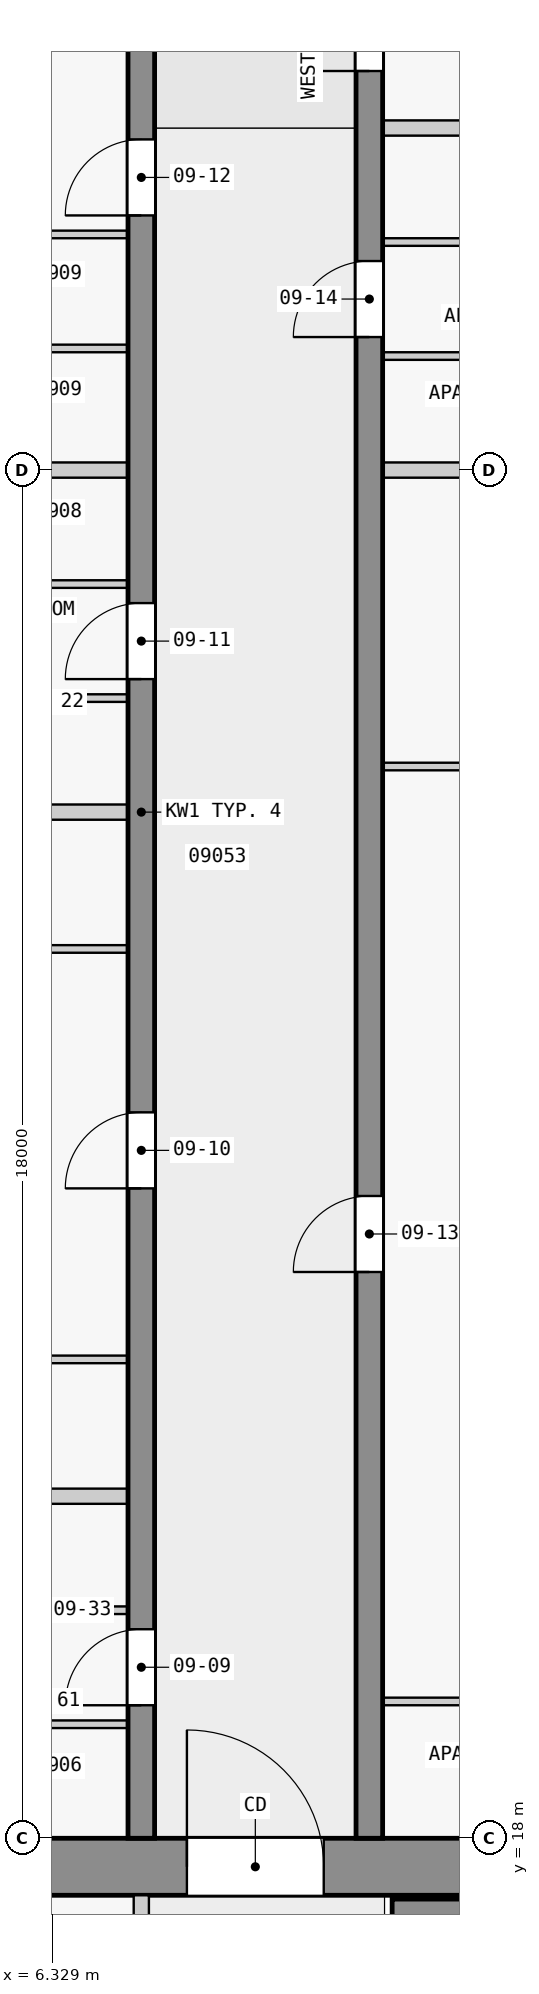
"""IFC4 building model, lengths in metres.
Left out: names, types, materials, properties, quantities, classifications, styles, units other than length and angle.
Written with IfcOpenShell. Run it as: python <this file> out.ifc"""

import sys

from ifc_helpers import new_model, si_unit, direction, frame, frame_2d, origin, place, context, subcontext, project, spatial, rectangle, extrude, element, fill, save


model = new_model("IFC4")
c1 = context("Model", 3, precision=1e-05, world=origin(), true_north=direction((0.0, 1.0)))
c2 = subcontext(c1, "Body", "Model", "MODEL_VIEW")
j1 = project(units=[si_unit("LENGTHUNIT", "METRE"), si_unit("PLANEANGLEUNIT", "RADIAN")], contexts=[c1])
p1 = place(None, origin())
s1 = spatial("IfcSite", under=j1, at=p1, CompositionType="ELEMENT")
p2 = place(p1, origin())
s2 = spatial("IfcBuilding", under=s1, at=p2, CompositionType="ELEMENT")
p3 = place(p2, frame((0.0, 0.0, 40.8)))
s3 = spatial("IfcBuildingStorey", under=s2, at=p3, CompositionType="ELEMENT", Elevation=40.8)
p4 = place(p3, frame((1.55, 17.625, 0.0), z_axis=(0.0, 0.0, 1.0), x_axis=(1.0, 0.0, 0.0)))
e1 = element("IfcWall", 1, at=p4, inside=s3, PredefinedType="SHEAR", context=c2, shape_type="SweptSolid", body=[
    extrude(rectangle(XDim=20.95, YDim=0.75, at=frame_2d((10.475, 0.0))), origin(), (0.0, 0.0, 1.0), 3.25),
])
p5 = place(p4, frame((6.55, 0.0, 0.0)))
e2 = element("IfcOpeningElement", 2, at=p5, cuts=e1, PredefinedType="OPENING", context=c2, shape_type="SweptSolid", body=[
    extrude(rectangle(XDim=1.8, YDim=2.1, at=frame_2d((0.9, 1.05))), frame((0.0, 0.385, 0.0), z_axis=(0.0, -1.0, 0.0), x_axis=(1.0, 0.0, 0.0)), (0.0, 0.0, 1.0), 0.77),
])
p6 = place(p3, frame((10.8, 17.05, 0.0), z_axis=(0.0, 0.0, 1.0), x_axis=(1.0, 0.0, 0.0)))
e3 = element("IfcWall", 3, at=p6, inside=s3, PredefinedType="SHEAR", context=c2, shape_type="SweptSolid", body=[
    extrude(rectangle(XDim=7.8, YDim=0.3, at=frame_2d((3.9, 0.0))), origin(), (0.0, 0.0, 1.0), 3.25),
])
p7 = place(p3, frame((7.5, 18.0, 0.0), z_axis=(0.0, 0.0, 1.0), x_axis=(0.0, 1.0, 0.0)))
e4 = element("IfcWall", 4, at=p7, inside=s3, PredefinedType="SHEAR", context=c2, shape_type="SweptSolid", body=[
    extrude(rectangle(XDim=27.0, YDim=0.35, at=frame_2d((13.5, 0.0))), origin(), (0.0, 0.0, 1.0), 3.25),
])
p8 = place(p7, frame((1.75, 0.0, 0.0)))
e5 = element("IfcOpeningElement", 5, at=p8, cuts=e4, PredefinedType="OPENING", context=c2, shape_type="SweptSolid", body=[
    extrude(rectangle(XDim=1.0, YDim=2.1, at=frame_2d((0.5, 1.05))), frame((0.0, 0.185, 0.0), z_axis=(0.0, -1.0, 0.0), x_axis=(1.0, 0.0, 0.0)), (0.0, 0.0, 1.0), 0.37),
])
p9 = place(p7, frame((8.55, 0.0, 0.0)))
e6 = element("IfcOpeningElement", 6, at=p9, cuts=e4, PredefinedType="OPENING", context=c2, shape_type="SweptSolid", body=[
    extrude(rectangle(XDim=1.0, YDim=2.1, at=frame_2d((0.5, 1.05))), frame((0.0, 0.185, 0.0), z_axis=(0.0, -1.0, 0.0), x_axis=(1.0, 0.0, 0.0)), (0.0, 0.0, 1.0), 0.37),
])
p10 = place(p7, frame((15.25, 0.0, 0.0)))
e7 = element("IfcOpeningElement", 7, at=p10, cuts=e4, PredefinedType="OPENING", context=c2, shape_type="SweptSolid", body=[
    extrude(rectangle(XDim=1.0, YDim=2.1, at=frame_2d((0.5, 1.05))), frame((0.0, 0.185, 0.0), z_axis=(0.0, -1.0, 0.0), x_axis=(1.0, 0.0, 0.0)), (0.0, 0.0, 1.0), 0.37),
])
p11 = place(p7, frame((21.35, 0.0, 0.0)))
e8 = element("IfcOpeningElement", 8, at=p11, cuts=e4, PredefinedType="OPENING", context=c2, shape_type="SweptSolid", body=[
    extrude(rectangle(XDim=1.0, YDim=2.1, at=frame_2d((0.5, 1.05))), frame((0.0, 0.185, 0.0), z_axis=(0.0, -1.0, 0.0), x_axis=(1.0, 0.0, 0.0)), (0.0, 0.0, 1.0), 0.37),
])
p12 = place(p3, frame((10.5, 18.0, 0.0), z_axis=(0.0, 0.0, 1.0), x_axis=(0.0, 1.0, 0.0)))
e9 = element("IfcWall", 9, at=p12, inside=s3, PredefinedType="SHEAR", context=c2, shape_type="SweptSolid", body=[
    extrude(rectangle(XDim=27.0, YDim=0.35, at=frame_2d((13.5, 0.0))), origin(), (0.0, 0.0, 1.0), 3.25),
])
p13 = place(p12, frame((7.45, 0.0, 0.0)))
e10 = element("IfcOpeningElement", 10, at=p13, cuts=e9, PredefinedType="OPENING", context=c2, shape_type="SweptSolid", body=[
    extrude(rectangle(XDim=1.0, YDim=2.1, at=frame_2d((0.5, 1.05))), frame((0.0, 0.185, 0.0), z_axis=(0.0, -1.0, 0.0), x_axis=(1.0, 0.0, 0.0)), (0.0, 0.0, 1.0), 0.37),
])
p14 = place(p12, frame((19.75, 0.0, 0.0)))
e11 = element("IfcOpeningElement", 11, at=p14, cuts=e9, PredefinedType="OPENING", context=c2, shape_type="SweptSolid", body=[
    extrude(rectangle(XDim=1.0, YDim=2.1, at=frame_2d((0.5, 1.05))), frame((0.0, 0.185, 0.0), z_axis=(0.0, -1.0, 0.0), x_axis=(1.0, 0.0, 0.0)), (0.0, 0.0, 1.0), 0.37),
])
p15 = place(p12, frame((23.25, 0.0, 0.0)))
e12 = element("IfcOpeningElement", 12, at=p15, cuts=e9, PredefinedType="OPENING", context=c2, shape_type="SweptSolid", body=[
    extrude(rectangle(XDim=0.9, YDim=2.1, at=frame_2d((0.45, 1.05))), frame((0.0, 0.185, 0.0), z_axis=(0.0, -1.0, 0.0), x_axis=(1.0, 0.0, 0.0)), (0.0, 0.0, 1.0), 0.37),
])
p16 = place(p12, frame((25.45, 0.0, 0.0)))
e13 = element("IfcOpeningElement", 13, at=p16, cuts=e9, PredefinedType="OPENING", context=c2, shape_type="SweptSolid", body=[
    extrude(rectangle(XDim=1.0, YDim=2.1, at=frame_2d((0.5, 1.05))), frame((0.0, 0.185, 0.0), z_axis=(0.0, -1.0, 0.0), x_axis=(1.0, 0.0, 0.0)), (0.0, 0.0, 1.0), 0.37),
])
p17 = place(p3, frame((7.5, 10.1, 0.0), z_axis=(0.0, 0.0, 1.0), x_axis=(0.0, 1.0, 0.0)))
e14 = element("IfcWall", 14, at=p17, inside=s3, PredefinedType="PARTITIONING", context=c2, shape_type="SweptSolid", body=[
    extrude(rectangle(XDim=7.15, YDim=0.2, at=frame_2d((3.575, 0.0))), origin(), (0.0, 0.0, 1.0), 3.25),
])
p18 = place(p17, frame((0.775, 0.0, 0.0)))
e15 = element("IfcOpeningElement", 15, at=p18, cuts=e14, PredefinedType="OPENING", context=c2, shape_type="SweptSolid", body=[
    extrude(rectangle(XDim=0.9, YDim=2.1, at=frame_2d((0.45, 1.05))), frame((0.0, 0.11, 0.0), z_axis=(0.0, -1.0, 0.0), x_axis=(1.0, 0.0, 0.0)), (0.0, 0.0, 1.0), 0.22),
])
p19 = place(p17, frame((3.225, 0.0, 0.0)))
e16 = element("IfcOpeningElement", 16, at=p19, cuts=e14, PredefinedType="OPENING", context=c2, shape_type="SweptSolid", body=[
    extrude(rectangle(XDim=0.9, YDim=2.1, at=frame_2d((0.45, 1.05))), frame((0.0, 0.11, 0.0), z_axis=(0.0, -1.0, 0.0), x_axis=(1.0, 0.0, 0.0)), (0.0, 0.0, 1.0), 0.22),
])
p20 = place(p17, frame((5.25, 0.0, 0.0)))
e17 = element("IfcOpeningElement", 17, at=p20, cuts=e14, PredefinedType="OPENING", context=c2, shape_type="SweptSolid", body=[
    extrude(rectangle(XDim=0.9, YDim=2.1, at=frame_2d((0.45, 1.05))), frame((0.0, 0.11, 0.0), z_axis=(0.0, -1.0, 0.0), x_axis=(1.0, 0.0, 0.0)), (0.0, 0.0, 1.0), 0.22),
])
p21 = place(p3, frame((7.325, 19.5, 0.0), z_axis=(0.0, 0.0, 1.0), x_axis=(-1.0, 0.0, 0.0)))
e18 = element("IfcWall", 18, at=p21, inside=s3, PredefinedType="PARTITIONING", context=c2, shape_type="SweptSolid", body=[
    extrude(rectangle(XDim=3.4, YDim=0.1, at=frame_2d((1.7, 0.0))), origin(), (0.0, 0.0, 1.0), 3.25),
])
p22 = place(p21, frame((1.25, 0.0, 0.0)))
e19 = element("IfcOpeningElement", 19, at=p22, cuts=e18, PredefinedType="OPENING", context=c2, shape_type="SweptSolid", body=[
    extrude(rectangle(XDim=0.9, YDim=2.1, at=frame_2d((0.45, 1.05))), frame((0.0, 0.06, 0.0), z_axis=(0.0, -1.0, 0.0), x_axis=(1.0, 0.0, 0.0)), (0.0, 0.0, 1.0), 0.12),
])
p23 = place(p3, frame((14.025, 19.8, 0.0), z_axis=(0.0, 0.0, 1.0), x_axis=(-1.0, 0.0, 0.0)))
e20 = element("IfcWall", 20, at=p23, inside=s3, PredefinedType="PARTITIONING", context=c2, shape_type="SweptSolid", body=[
    extrude(rectangle(XDim=3.35, YDim=0.1, at=frame_2d((1.675, 0.0))), origin(), (0.0, 0.0, 1.0), 3.25),
])
p24 = place(p23, frame((1.25, 0.0, 0.0)))
e21 = element("IfcOpeningElement", 21, at=p24, cuts=e20, PredefinedType="OPENING", context=c2, shape_type="SweptSolid", body=[
    extrude(rectangle(XDim=0.9, YDim=2.1, at=frame_2d((0.45, 1.05))), frame((0.0, 0.06, 0.0), z_axis=(0.0, -1.0, 0.0), x_axis=(1.0, 0.0, 0.0)), (0.0, 0.0, 1.0), 0.12),
])
p25 = place(p3, frame((3.925, 21.0, 0.0), z_axis=(0.0, 0.0, 1.0), x_axis=(1.0, 0.0, 0.0)))
e22 = element("IfcWall", 22, at=p25, inside=s3, PredefinedType="PARTITIONING", context=c2, shape_type="SweptSolid", body=[
    extrude(rectangle(XDim=3.4, YDim=0.1, at=frame_2d((1.7, 0.0))), origin(), (0.0, 0.0, 1.0), 3.25),
])
p26 = place(p25, frame((1.25, 0.0, 0.0)))
e23 = element("IfcOpeningElement", 23, at=p26, cuts=e22, PredefinedType="OPENING", context=c2, shape_type="SweptSolid", body=[
    extrude(rectangle(XDim=0.9, YDim=2.1, at=frame_2d((0.45, 1.05))), frame((0.0, 0.06, 0.0), z_axis=(0.0, -1.0, 0.0), x_axis=(1.0, 0.0, 0.0)), (0.0, 0.0, 1.0), 0.12),
])
p27 = place(p3, frame((7.325, 22.5, 0.0), z_axis=(0.0, 0.0, 1.0), x_axis=(-1.0, 0.0, 0.0)))
e24 = element("IfcWall", 24, at=p27, inside=s3, PredefinedType="PARTITIONING", context=c2, shape_type="SweptSolid", body=[
    extrude(rectangle(XDim=3.3, YDim=0.2, at=frame_2d((1.65, 0.0))), origin(), (0.0, 0.0, 1.0), 3.25),
])
p28 = place(p3, frame((7.325, 24.3, 0.0), z_axis=(0.0, 0.0, 1.0), x_axis=(-1.0, 0.0, 0.0)))
e25 = element("IfcWall", 25, at=p28, inside=s3, PredefinedType="PARTITIONING", context=c2, shape_type="SweptSolid", body=[
    extrude(rectangle(XDim=3.4, YDim=0.1, at=frame_2d((1.7, 0.0))), origin(), (0.0, 0.0, 1.0), 3.25),
])
p29 = place(p28, frame((1.25, 0.0, 0.0)))
e26 = element("IfcOpeningElement", 26, at=p29, cuts=e25, PredefinedType="OPENING", context=c2, shape_type="SweptSolid", body=[
    extrude(rectangle(XDim=0.9, YDim=2.1, at=frame_2d((0.45, 1.05))), frame((0.0, 0.06, 0.0), z_axis=(0.0, -1.0, 0.0), x_axis=(1.0, 0.0, 0.0)), (0.0, 0.0, 1.0), 0.12),
])
p30 = place(p3, frame((3.925, 29.7, 0.0), z_axis=(0.0, 0.0, 1.0), x_axis=(1.0, 0.0, 0.0)))
e27 = element("IfcWall", 27, at=p30, inside=s3, PredefinedType="PARTITIONING", context=c2, shape_type="SweptSolid", body=[
    extrude(rectangle(XDim=3.4, YDim=0.1, at=frame_2d((1.7, 0.0))), origin(), (0.0, 0.0, 1.0), 3.25),
])
p31 = place(p30, frame((1.25, 0.0, 0.0)))
e28 = element("IfcOpeningElement", 28, at=p31, cuts=e27, PredefinedType="OPENING", context=c2, shape_type="SweptSolid", body=[
    extrude(rectangle(XDim=0.9, YDim=2.1, at=frame_2d((0.45, 1.05))), frame((0.0, 0.06, 0.0), z_axis=(0.0, -1.0, 0.0), x_axis=(1.0, 0.0, 0.0)), (0.0, 0.0, 1.0), 0.12),
])
p32 = place(p3, frame((7.325, 31.5, 0.0), z_axis=(0.0, 0.0, 1.0), x_axis=(-1.0, 0.0, 0.0)))
e29 = element("IfcWall", 29, at=p32, inside=s3, PredefinedType="PARTITIONING", context=c2, shape_type="SweptSolid", body=[
    extrude(rectangle(XDim=3.3, YDim=0.2, at=frame_2d((1.65, 0.0))), origin(), (0.0, 0.0, 1.0), 3.25),
])
p33 = place(p3, frame((10.675, 32.1, 0.0), z_axis=(0.0, 0.0, 1.0), x_axis=(1.0, 0.0, 0.0)))
e30 = element("IfcWall", 30, at=p33, inside=s3, PredefinedType="PARTITIONING", context=c2, shape_type="SweptSolid", body=[
    extrude(rectangle(XDim=3.35, YDim=0.1, at=frame_2d((1.675, 0.0))), origin(), (0.0, 0.0, 1.0), 3.25),
])
p34 = place(p33, frame((1.25, 0.0, 0.0)))
e31 = element("IfcOpeningElement", 31, at=p34, cuts=e30, PredefinedType="OPENING", context=c2, shape_type="SweptSolid", body=[
    extrude(rectangle(XDim=0.9, YDim=2.1, at=frame_2d((0.45, 1.05))), frame((0.0, 0.06, 0.0), z_axis=(0.0, -1.0, 0.0), x_axis=(1.0, 0.0, 0.0)), (0.0, 0.0, 1.0), 0.12),
])
p35 = place(p3, frame((7.325, 33.0, 0.0), z_axis=(0.0, 0.0, 1.0), x_axis=(-1.0, 0.0, 0.0)))
e32 = element("IfcWall", 32, at=p35, inside=s3, PredefinedType="PARTITIONING", context=c2, shape_type="SweptSolid", body=[
    extrude(rectangle(XDim=3.4, YDim=0.1, at=frame_2d((1.7, 0.0))), origin(), (0.0, 0.0, 1.0), 3.25),
])
p36 = place(p35, frame((1.25, 0.0, 0.0)))
e33 = element("IfcOpeningElement", 33, at=p36, cuts=e32, PredefinedType="OPENING", context=c2, shape_type="SweptSolid", body=[
    extrude(rectangle(XDim=0.9, YDim=2.1, at=frame_2d((0.45, 1.05))), frame((0.0, 0.06, 0.0), z_axis=(0.0, -1.0, 0.0), x_axis=(1.0, 0.0, 0.0)), (0.0, 0.0, 1.0), 0.12),
])
p37 = place(p3, frame((3.975, 34.5, 0.0), z_axis=(0.0, 0.0, 1.0), x_axis=(1.0, 0.0, 0.0)))
e34 = element("IfcWall", 34, at=p37, inside=s3, PredefinedType="PARTITIONING", context=c2, shape_type="SweptSolid", body=[
    extrude(rectangle(XDim=3.35, YDim=0.1, at=frame_2d((1.675, 0.0))), origin(), (0.0, 0.0, 1.0), 3.25),
])
p38 = place(p37, frame((1.25, 0.0, 0.0)))
e35 = element("IfcOpeningElement", 35, at=p38, cuts=e34, PredefinedType="OPENING", context=c2, shape_type="SweptSolid", body=[
    extrude(rectangle(XDim=0.9, YDim=2.1, at=frame_2d((0.45, 1.05))), frame((0.0, 0.06, 0.0), z_axis=(0.0, -1.0, 0.0), x_axis=(1.0, 0.0, 0.0)), (0.0, 0.0, 1.0), 0.12),
])
p39 = place(p3, frame((7.325, 36.0, 0.0), z_axis=(0.0, 0.0, 1.0), x_axis=(-1.0, 0.0, 0.0)))
e36 = element("IfcWall", 36, at=p39, inside=s3, PredefinedType="PARTITIONING", context=c2, shape_type="SweptSolid", body=[
    extrude(rectangle(XDim=3.4, YDim=0.2, at=frame_2d((1.7, 0.0))), origin(), (0.0, 0.0, 1.0), 3.25),
])
p40 = place(p3, frame((16.6, 36.0, 0.0), z_axis=(0.0, 0.0, 1.0), x_axis=(-1.0, 0.0, 0.0)))
e37 = element("IfcWall", 37, at=p40, inside=s3, PredefinedType="PARTITIONING", context=c2, shape_type="SweptSolid", body=[
    extrude(rectangle(XDim=5.925, YDim=0.2, at=frame_2d((2.962, 0.0))), origin(), (0.0, 0.0, 1.0), 3.25),
])
p41 = place(p3, frame((14.025, 37.5, 0.0), z_axis=(0.0, 0.0, 1.0), x_axis=(-1.0, 0.0, 0.0)))
e38 = element("IfcWall", 38, at=p41, inside=s3, PredefinedType="PARTITIONING", context=c2, shape_type="SweptSolid", body=[
    extrude(rectangle(XDim=3.35, YDim=0.1, at=frame_2d((1.675, 0.0))), origin(), (0.0, 0.0, 1.0), 3.25),
])
p42 = place(p41, frame((1.25, 0.0, 0.0)))
e39 = element("IfcOpeningElement", 39, at=p42, cuts=e38, PredefinedType="OPENING", context=c2, shape_type="SweptSolid", body=[
    extrude(rectangle(XDim=0.9, YDim=2.1, at=frame_2d((0.45, 1.05))), frame((0.0, 0.06, 0.0), z_axis=(0.0, -1.0, 0.0), x_axis=(1.0, 0.0, 0.0)), (0.0, 0.0, 1.0), 0.12),
])
p43 = place(p3, frame((7.325, 37.6, 0.0), z_axis=(0.0, 0.0, 1.0), x_axis=(-1.0, 0.0, 0.0)))
e40 = element("IfcWall", 40, at=p43, inside=s3, PredefinedType="PARTITIONING", context=c2, shape_type="SweptSolid", body=[
    extrude(rectangle(XDim=3.35, YDim=0.1, at=frame_2d((1.675, 0.0))), origin(), (0.0, 0.0, 1.0), 3.25),
])
p44 = place(p3, frame((10.675, 39.0, 0.0), z_axis=(0.0, 0.0, 1.0), x_axis=(1.0, 0.0, 0.0)))
e41 = element("IfcWall", 41, at=p44, inside=s3, PredefinedType="PARTITIONING", context=c2, shape_type="SweptSolid", body=[
    extrude(rectangle(XDim=3.4, YDim=0.1, at=frame_2d((1.7, 0.0))), origin(), (0.0, 0.0, 1.0), 3.25),
])
p45 = place(p44, frame((1.25, 0.0, 0.0)))
e42 = element("IfcOpeningElement", 42, at=p45, cuts=e41, PredefinedType="OPENING", context=c2, shape_type="SweptSolid", body=[
    extrude(rectangle(XDim=0.9, YDim=2.1, at=frame_2d((0.45, 1.05))), frame((0.0, 0.06, 0.0), z_axis=(0.0, -1.0, 0.0), x_axis=(1.0, 0.0, 0.0)), (0.0, 0.0, 1.0), 0.12),
])
p46 = place(p3, frame((7.325, 39.1, 0.0), z_axis=(0.0, 0.0, 1.0), x_axis=(-1.0, 0.0, 0.0)))
e43 = element("IfcWall", 43, at=p46, inside=s3, PredefinedType="PARTITIONING", context=c2, shape_type="SweptSolid", body=[
    extrude(rectangle(XDim=3.35, YDim=0.1, at=frame_2d((1.675, 0.0))), origin(), (0.0, 0.0, 1.0), 3.25),
])
p47 = place(p46, frame((1.25, 0.0, 0.0)))
e44 = element("IfcOpeningElement", 44, at=p47, cuts=e43, PredefinedType="OPENING", context=c2, shape_type="SweptSolid", body=[
    extrude(rectangle(XDim=0.9, YDim=2.1, at=frame_2d((0.45, 1.05))), frame((0.0, 0.06, 0.0), z_axis=(0.0, -1.0, 0.0), x_axis=(1.0, 0.0, 0.0)), (0.0, 0.0, 1.0), 0.12),
])
p48 = place(p3, frame((13.975, 40.5, 0.0), z_axis=(0.0, 0.0, 1.0), x_axis=(-1.0, 0.0, 0.0)))
e45 = element("IfcWall", 45, at=p48, inside=s3, PredefinedType="PARTITIONING", context=c2, shape_type="SweptSolid", body=[
    extrude(rectangle(XDim=3.3, YDim=0.2, at=frame_2d((1.65, 0.0))), origin(), (0.0, 0.0, 1.0), 3.25),
])
p49 = place(p5, origin())
e46 = element("IfcDoor", 46, at=p49, inside=s3, OperationType="DOUBLE_DOOR_SINGLE_SWING", PredefinedType="DOOR", context=c2, shape_type="SweptSolid", body=[
    extrude(rectangle(XDim=1.8, YDim=2.1, at=frame_2d((0.9, 1.05))), frame((0.0, 0.025, 0.0), z_axis=(0.0, -1.0, 0.0), x_axis=(1.0, 0.0, 0.0)), (0.0, 0.0, 1.0), 0.05),
])
fill(e2, e46)
p50 = place(p8, origin())
e47 = element("IfcDoor", 47, at=p50, inside=s3, OperationType="SINGLE_SWING_LEFT", PredefinedType="DOOR", context=c2, shape_type="SweptSolid", body=[
    extrude(rectangle(XDim=1.0, YDim=2.1, at=frame_2d((0.5, 1.05))), frame((0.0, 0.025, 0.0), z_axis=(0.0, -1.0, 0.0), x_axis=(1.0, 0.0, 0.0)), (0.0, 0.0, 1.0), 0.05),
])
fill(e5, e47)
p51 = place(p9, origin())
e48 = element("IfcDoor", 48, at=p51, inside=s3, OperationType="SINGLE_SWING_LEFT", PredefinedType="DOOR", context=c2, shape_type="SweptSolid", body=[
    extrude(rectangle(XDim=1.0, YDim=2.1, at=frame_2d((0.5, 1.05))), frame((0.0, 0.025, 0.0), z_axis=(0.0, -1.0, 0.0), x_axis=(1.0, 0.0, 0.0)), (0.0, 0.0, 1.0), 0.05),
])
fill(e6, e48)
p52 = place(p10, origin())
e49 = element("IfcDoor", 49, at=p52, inside=s3, OperationType="SINGLE_SWING_RIGHT", PredefinedType="DOOR", context=c2, shape_type="SweptSolid", body=[
    extrude(rectangle(XDim=1.0, YDim=2.1, at=frame_2d((0.5, 1.05))), frame((0.0, 0.025, 0.0), z_axis=(0.0, -1.0, 0.0), x_axis=(1.0, 0.0, 0.0)), (0.0, 0.0, 1.0), 0.05),
])
fill(e7, e49)
p53 = place(p11, origin())
e50 = element("IfcDoor", 50, at=p53, inside=s3, OperationType="SINGLE_SWING_RIGHT", PredefinedType="DOOR", context=c2, shape_type="SweptSolid", body=[
    extrude(rectangle(XDim=1.0, YDim=2.1, at=frame_2d((0.5, 1.05))), frame((0.0, 0.025, 0.0), z_axis=(0.0, -1.0, 0.0), x_axis=(1.0, 0.0, 0.0)), (0.0, 0.0, 1.0), 0.05),
])
fill(e8, e50)
p54 = place(p13, origin())
e51 = element("IfcDoor", 51, at=p54, inside=s3, OperationType="SINGLE_SWING_LEFT", PredefinedType="DOOR", context=c2, shape_type="SweptSolid", body=[
    extrude(rectangle(XDim=1.0, YDim=2.1, at=frame_2d((0.5, 1.05))), frame((0.0, 0.025, 0.0), z_axis=(0.0, -1.0, 0.0), x_axis=(1.0, 0.0, 0.0)), (0.0, 0.0, 1.0), 0.05),
])
fill(e10, e51)
p55 = place(p14, origin())
e52 = element("IfcDoor", 52, at=p55, inside=s3, OperationType="SINGLE_SWING_RIGHT", PredefinedType="DOOR", context=c2, shape_type="SweptSolid", body=[
    extrude(rectangle(XDim=1.0, YDim=2.1, at=frame_2d((0.5, 1.05))), frame((0.0, 0.025, 0.0), z_axis=(0.0, -1.0, 0.0), x_axis=(1.0, 0.0, 0.0)), (0.0, 0.0, 1.0), 0.05),
])
fill(e11, e52)
p56 = place(p15, origin())
e53 = element("IfcDoor", 53, at=p56, inside=s3, OperationType="SINGLE_SWING_RIGHT", PredefinedType="DOOR", context=c2, shape_type="SweptSolid", body=[
    extrude(rectangle(XDim=0.9, YDim=2.1, at=frame_2d((0.45, 1.05))), frame((0.0, 0.025, 0.0), z_axis=(0.0, -1.0, 0.0), x_axis=(1.0, 0.0, 0.0)), (0.0, 0.0, 1.0), 0.05),
])
fill(e12, e53)
save(model, sys.argv[1])
